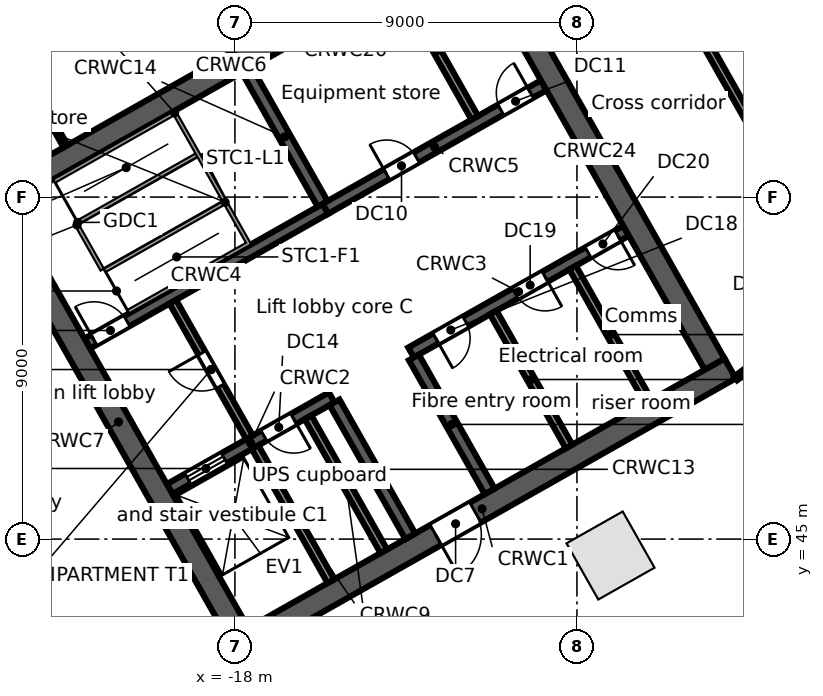
"""IFC4 building model, lengths in metres.
Left out: names, types, materials, properties, quantities, classifications, styles, units other than length and angle.
Written with IfcOpenShell. Run it as: python <this file> out.ifc"""

import sys

from ifc_helpers import new_model, si_unit, direction, frame, frame_2d, origin, origin_2d, place, context, subcontext, project, spatial, rectangle, extrude, element, fill, save


model = new_model("IFC4")
c1 = context("Model", 3, precision=1e-05, world=origin(), true_north=direction((0.0, 1.0)))
c2 = subcontext(c1, "Body", "Model", "MODEL_VIEW")
j1 = project(units=[si_unit("LENGTHUNIT", "METRE"), si_unit("PLANEANGLEUNIT", "RADIAN")], contexts=[c1])
p1 = place(None, origin())
s1 = spatial("IfcSite", under=j1, at=p1, CompositionType="ELEMENT")
p2 = place(p1, origin())
s2 = spatial("IfcBuilding", under=s1, at=p2, CompositionType="ELEMENT")
p3 = place(p2, frame((0.0, 0.0, 21.5)))
s3 = spatial("IfcBuildingStorey", under=s2, at=p3, CompositionType="ELEMENT", Elevation=21.5)
p4 = place(p3, frame((-8.117, 44.568, 0.0), z_axis=(0.0, 0.0, 1.0), x_axis=(0.87035569594, 0.492423560103, 0.0)))
e1 = element("IfcColumn", 1, at=p4, inside=s3, PredefinedType="COLUMN", context=c2, shape_type="SweptSolid", body=[
    extrude(rectangle(XDim=1.7, YDim=1.7, at=origin_2d()), origin(), (0.0, 0.0, 1.0), 5.0),
])
p5 = place(p3, frame((-63.707, 41.701, 0.0), z_axis=(0.0, 0.0, 1.0), x_axis=(0.870355510268, 0.492423888277, 0.0)))
e2 = element("IfcWall", 2, at=p5, inside=s3, PredefinedType="STANDARD", context=c2, shape_type="SweptSolid", body=[
    extrude(rectangle(XDim=67.903, YDim=0.3, at=frame_2d((33.952, 0.0))), origin(), (0.0, 0.0, 1.0), 4.68),
])
p6 = place(p3, frame((-18.024, 42.104, 0.0), z_axis=(0.0, 0.0, 1.0), x_axis=(0.870360574057, 0.492414937962, 0.0)))
e3 = element("IfcWall", 3, at=p6, inside=s3, PredefinedType="SOLIDWALL", context=c2, shape_type="SweptSolid", body=[
    extrude(rectangle(XDim=15.0, YDim=0.6, at=frame_2d((7.5, 0.0))), origin(), (0.0, 0.0, 1.0), 4.68),
])
p7 = place(p6, frame((6.1, 0.0, 0.0)))
e4 = element("IfcOpeningElement", 4, at=p7, cuts=e3, PredefinedType="OPENING", context=c2, shape_type="SweptSolid", body=[
    extrude(rectangle(XDim=1.2, YDim=2.1, at=frame_2d((0.6, 1.05))), frame((0.0, 0.31, 0.0), z_axis=(0.0, -1.0, 0.0), x_axis=(1.0, 0.0, 0.0)), (0.0, 0.0, 1.0), 0.62),
])
p8 = place(p3, frame((-19.718, 46.316, 0.0), z_axis=(0.0, 0.0, 1.0), x_axis=(0.870353963862, 0.492426621528, 0.0)))
e5 = element("IfcWall", 5, at=p8, inside=s3, PredefinedType="SOLIDWALL", context=c2, shape_type="SweptSolid", body=[
    extrude(rectangle(XDim=4.9, YDim=0.3, at=frame_2d((2.45, 0.0))), origin(), (0.0, 0.0, 1.0), 4.68),
])
p9 = place(p8, frame((0.55, 0.0, 0.0)))
e6 = element("IfcOpeningElement", 6, at=p9, cuts=e5, PredefinedType="OPENING", context=c2, shape_type="SweptSolid", body=[
    extrude(rectangle(XDim=1.1, YDim=2.1, at=frame_2d((0.55, 1.05))), frame((0.0, 0.16, 0.0), z_axis=(0.0, -1.0, 0.0), x_axis=(1.0, 0.0, 0.0)), (0.0, 0.0, 1.0), 0.32),
])
p10 = place(p8, frame((2.85, 0.0, 0.0)))
e7 = element("IfcOpeningElement", 7, at=p10, cuts=e5, PredefinedType="OPENING", context=c2, shape_type="SweptSolid", body=[
    extrude(rectangle(XDim=0.9, YDim=2.1, at=frame_2d((0.45, 1.05))), frame((0.0, 0.16, 0.0), z_axis=(0.0, -1.0, 0.0), x_axis=(1.0, 0.0, 0.0)), (0.0, 0.0, 1.0), 0.32),
])
p11 = place(p3, frame((-13.365, 49.911, 0.0), z_axis=(0.0, 0.0, 1.0), x_axis=(0.870340995471, 0.49244954219, 0.0)))
e8 = element("IfcWall", 8, at=p11, inside=s3, PredefinedType="SOLIDWALL", context=c2, shape_type="SweptSolid", body=[
    extrude(rectangle(XDim=6.5, YDim=0.3, at=frame_2d((3.25, 0.0))), origin(), (0.0, 0.0, 1.0), 4.68),
])
p12 = place(p11, frame((0.75, 0.0, 0.0)))
e9 = element("IfcOpeningElement", 9, at=p12, cuts=e8, PredefinedType="OPENING", context=c2, shape_type="SweptSolid", body=[
    extrude(rectangle(XDim=0.9, YDim=2.1, at=frame_2d((0.45, 1.05))), frame((0.0, 0.16, 0.0), z_axis=(0.0, -1.0, 0.0), x_axis=(1.0, 0.0, 0.0)), (0.0, 0.0, 1.0), 0.32),
])
p13 = place(p11, frame((3.15, 0.0, 0.0)))
e10 = element("IfcOpeningElement", 10, at=p13, cuts=e8, PredefinedType="OPENING", context=c2, shape_type="SweptSolid", body=[
    extrude(rectangle(XDim=0.9, YDim=2.1, at=frame_2d((0.45, 1.05))), frame((0.0, 0.16, 0.0), z_axis=(0.0, -1.0, 0.0), x_axis=(1.0, 0.0, 0.0)), (0.0, 0.0, 1.0), 0.32),
])
p14 = place(p11, frame((5.35, 0.0, 0.0)))
e11 = element("IfcOpeningElement", 11, at=p14, cuts=e8, PredefinedType="OPENING", context=c2, shape_type="SweptSolid", body=[
    extrude(rectangle(XDim=0.9, YDim=2.1, at=frame_2d((0.45, 1.05))), frame((0.0, 0.16, 0.0), z_axis=(0.0, -1.0, 0.0), x_axis=(1.0, 0.0, 0.0)), (0.0, 0.0, 1.0), 0.32),
])
p15 = place(p3, frame((-21.885, 50.146, 0.0), z_axis=(0.0, 0.0, 1.0), x_axis=(0.870359411463, 0.492416992881, 0.0)))
e12 = element("IfcWall", 12, at=p15, inside=s3, PredefinedType="SOLIDWALL", context=c2, shape_type="SweptSolid", body=[
    extrude(rectangle(XDim=7.2, YDim=0.3, at=frame_2d((3.6, 0.0))), origin(), (0.0, 0.0, 1.0), 4.68),
])
p16 = place(p15, frame((0.2, 0.0, 0.0)))
e13 = element("IfcOpeningElement", 13, at=p16, cuts=e12, PredefinedType="OPENING", context=c2, shape_type="SweptSolid", body=[
    extrude(rectangle(XDim=1.0, YDim=2.1, at=frame_2d((0.5, 1.05))), frame((0.0, 0.16, 0.0), z_axis=(0.0, -1.0, 0.0), x_axis=(1.0, 0.0, 0.0)), (0.0, 0.0, 1.0), 0.32),
])
p17 = place(p3, frame((-15.618, 53.691, 0.0), z_axis=(0.0, 0.0, 1.0), x_axis=(0.870356769198, 0.492421663121, 0.0)))
e14 = element("IfcWall", 14, at=p17, inside=s3, PredefinedType="SOLIDWALL", context=c2, shape_type="SweptSolid", body=[
    extrude(rectangle(XDim=6.6, YDim=0.3, at=frame_2d((3.3, 0.0))), origin(), (0.0, 0.0, 1.0), 4.68),
])
p18 = place(p17, frame((1.85, 0.0, 0.0)))
e15 = element("IfcOpeningElement", 15, at=p18, cuts=e14, PredefinedType="OPENING", context=c2, shape_type="SweptSolid", body=[
    extrude(rectangle(XDim=0.9, YDim=2.1, at=frame_2d((0.45, 1.05))), frame((0.0, 0.16, 0.0), z_axis=(0.0, -1.0, 0.0), x_axis=(1.0, 0.0, 0.0)), (0.0, 0.0, 1.0), 0.32),
])
p19 = place(p17, frame((5.3, 0.0, 0.0)))
e16 = element("IfcOpeningElement", 16, at=p19, cuts=e14, PredefinedType="OPENING", context=c2, shape_type="SweptSolid", body=[
    extrude(rectangle(XDim=0.9, YDim=2.1, at=frame_2d((0.45, 1.05))), frame((0.0, 0.16, 0.0), z_axis=(0.0, -1.0, 0.0), x_axis=(1.0, 0.0, 0.0)), (0.0, 0.0, 1.0), 0.32),
])
p20 = place(p3, frame((-24.623, 53.767, 0.0), z_axis=(0.0, 0.0, 1.0), x_axis=(0.870356627484, 0.492421913601, 0.0)))
e17 = element("IfcWall", 17, at=p20, inside=s3, PredefinedType="SOLIDWALL", context=c2, shape_type="SweptSolid", body=[
    extrude(rectangle(XDim=15.0, YDim=0.6, at=frame_2d((7.5, 0.0))), origin(), (0.0, 0.0, 1.0), 4.68),
])
p21 = place(p3, frame((-24.214, 53.654, 0.0), z_axis=(0.0, 0.0, 1.0), x_axis=(0.492441221355, -0.870345703448, 0.0)))
e18 = element("IfcWall", 18, at=p21, inside=s3, PredefinedType="SOLIDWALL", context=c2, shape_type="SweptSolid", body=[
    extrude(rectangle(XDim=12.8, YDim=0.6, at=frame_2d((6.4, 0.0))), origin(), (0.0, 0.0, 1.0), 4.68),
])
p22 = place(p3, frame((-17.469, 47.417, 0.0), z_axis=(0.0, 0.0, 1.0), x_axis=(0.492440575896, -0.870346068648, 0.0)))
e19 = element("IfcWall", 19, at=p22, inside=s3, PredefinedType="SOLIDWALL", context=c2, shape_type="SweptSolid", body=[
    extrude(rectangle(XDim=4.05, YDim=0.2, at=frame_2d((2.025, 0.0))), origin(), (0.0, 0.0, 1.0), 4.68),
])
p23 = place(p3, frame((-19.635, 51.246, 0.0), z_axis=(0.0, 0.0, 1.0), x_axis=(0.492408451753, -0.87036424366, 0.0)))
e20 = element("IfcWall", 20, at=p23, inside=s3, PredefinedType="PARTITIONING", context=c2, shape_type="SweptSolid", body=[
    extrude(rectangle(XDim=4.1, YDim=0.2, at=frame_2d((2.05, 0.0))), origin(), (0.0, 0.0, 1.0), 4.68),
])
p24 = place(p23, frame((1.55, 0.0, 0.0)))
e21 = element("IfcOpeningElement", 21, at=p24, cuts=e20, PredefinedType="OPENING", context=c2, shape_type="SweptSolid", body=[
    extrude(rectangle(XDim=1.0, YDim=2.1, at=frame_2d((0.5, 1.05))), frame((0.0, 0.11, 0.0), z_axis=(0.0, -1.0, 0.0), x_axis=(1.0, 0.0, 0.0)), (0.0, 0.0, 1.0), 0.22),
])
p25 = place(p3, frame((-16.076, 48.205, 0.0), z_axis=(0.0, 0.0, 1.0), x_axis=(0.492394910396, -0.870371904542, 0.0)))
e22 = element("IfcWall", 22, at=p25, inside=s3, PredefinedType="SOLIDWALL", context=c2, shape_type="SweptSolid", body=[
    extrude(rectangle(XDim=4.05, YDim=0.2, at=frame_2d((2.025, 0.0))), origin(), (0.0, 0.0, 1.0), 4.68),
])
p26 = place(p3, frame((-15.379, 48.599, 0.0), z_axis=(0.0, 0.0, 1.0), x_axis=(0.492394910396, -0.870371904542, 0.0)))
e23 = element("IfcWall", 23, at=p26, inside=s3, PredefinedType="SOLIDWALL", context=c2, shape_type="SweptSolid", body=[
    extrude(rectangle(XDim=4.05, YDim=0.3, at=frame_2d((2.025, 0.0))), origin(), (0.0, 0.0, 1.0), 4.68),
])
p27 = place(p3, frame((-17.686, 57.347, 0.0), z_axis=(0.0, 0.0, 1.0), x_axis=(0.492420746998, -0.870357287513, 0.0)))
e24 = element("IfcWall", 24, at=p27, inside=s3, PredefinedType="SOLIDWALL", context=c2, shape_type="SweptSolid", body=[
    extrude(rectangle(XDim=4.05, YDim=0.3, at=frame_2d((2.025, 0.0))), origin(), (0.0, 0.0, 1.0), 4.68),
])
p28 = place(p3, frame((-13.291, 49.781, 0.0), z_axis=(0.0, 0.0, 1.0), x_axis=(0.492394910396, -0.870371904542, 0.0)))
e25 = element("IfcWall", 25, at=p28, inside=s3, PredefinedType="SOLIDWALL", context=c2, shape_type="SweptSolid", body=[
    extrude(rectangle(XDim=4.05, YDim=0.3, at=frame_2d((2.025, 0.0))), origin(), (0.0, 0.0, 1.0), 4.68),
])
for number, where, z_axis, x_axis in (
    (26, (-11.202, 50.962, 0.0), (0.0, 0.0, 1.0), (0.492, -0.87, 0.0)),
    (27, (-13.683, 59.612, 0.0), (0.0, 0.0, 1.0), (0.492, -0.87, 0.0)),
):
    element("IfcWall", number, at=place(p3, frame(where, z_axis=z_axis, x_axis=x_axis)), inside=s3, PredefinedType="PARTITIONING", context=c2, shape_type="SweptSolid", body=[
        extrude(rectangle(XDim=4.05, YDim=0.2, at=frame_2d((2.025, 0.0))), origin(), (0.0, 0.0, 1.0), 4.68),
    ])
p29 = place(p3, frame((-9.113, 52.144, 0.0), z_axis=(0.0, 0.0, 1.0), x_axis=(0.492394910396, -0.870371904542, 0.0)))
e28 = element("IfcWall", 28, at=p29, inside=s3, PredefinedType="PARTITIONING", context=c2, shape_type="SweptSolid", body=[
    extrude(rectangle(XDim=4.05, YDim=0.2, at=frame_2d((2.025, 0.0))), origin(), (0.0, 0.0, 1.0), 4.68),
])
p30 = place(p3, frame((-11.681, 60.744, 0.0), z_axis=(0.0, 0.0, 1.0), x_axis=(0.492426772896, -0.870353878221, 0.0)))
e29 = element("IfcWall", 29, at=p30, inside=s3, PredefinedType="SOLIDWALL", context=c2, shape_type="SweptSolid", body=[
    extrude(rectangle(XDim=12.8, YDim=0.6, at=frame_2d((6.4, 0.0))), origin(), (0.0, 0.0, 1.0), 4.68),
])
p31 = place(p3, frame((-24.18, 58.384, 0.0), z_axis=(0.0, 0.0, 1.0), x_axis=(0.492521469645, -0.870300294116, 0.0)))
e30 = element("IfcWall", 30, at=p31, inside=s3, PredefinedType="PARTITIONING", context=c2, shape_type="SweptSolid", body=[
    extrude(rectangle(XDim=3.5, YDim=0.125, at=frame_2d((1.75, 0.0))), origin(), (0.0, 0.0, 1.0), 3.96),
])
p32 = place(p3, frame((-10.254, 66.263, 0.0), z_axis=(0.0, 0.0, 1.0), x_axis=(0.492411664329, -0.870362426138, 0.0)))
e31 = element("IfcWall", 31, at=p32, inside=s3, PredefinedType="PARTITIONING", context=c2, shape_type="SweptSolid", body=[
    extrude(rectangle(XDim=17.0, YDim=0.2, at=frame_2d((8.5, 0.0))), origin(), (0.0, 0.0, 1.0), 3.742),
])
p33 = place(p32, frame((7.7, 0.0, 0.0)))
e32 = element("IfcOpeningElement", 32, at=p33, cuts=e31, PredefinedType="OPENING", context=c2, shape_type="SweptSolid", body=[
    extrude(rectangle(XDim=1.8, YDim=2.1, at=frame_2d((0.9, 1.05))), frame((0.0, 0.11, 0.0), z_axis=(0.0, -1.0, 0.0), x_axis=(1.0, 0.0, 0.0)), (0.0, 0.0, 1.0), 0.22),
])
p34 = place(p3, frame((-4.821, 49.23, 0.0), z_axis=(0.0, 0.0, 1.0), x_axis=(0.795615322848, 0.605802160816, 0.0)))
e33 = element("IfcWall", 33, at=p34, inside=s3, PredefinedType="PARTITIONING", context=c2, shape_type="SweptSolid", body=[
    extrude(rectangle(XDim=3.693, YDim=0.125, at=frame_2d((1.846, 0.0))), origin(), (0.0, 0.0, 1.0), 4.68),
])
p35 = place(p34, frame((1.45, 0.0, 0.0)))
e34 = element("IfcOpeningElement", 34, at=p35, cuts=e33, PredefinedType="OPENING", context=c2, shape_type="SweptSolid", body=[
    extrude(rectangle(XDim=0.9, YDim=2.1, at=frame_2d((0.45, 1.05))), frame((0.0, 0.073, 0.0), z_axis=(0.0, -1.0, 0.0), x_axis=(1.0, 0.0, 0.0)), (0.0, 0.0, 1.0), 0.145),
])
p36 = place(p9, origin())
e35 = element("IfcDoor", 35, at=p36, inside=s3, OperationType="DOUBLE_DOOR_SLIDING", PredefinedType="DOOR", context=c2, shape_type="SweptSolid", body=[
    extrude(rectangle(XDim=1.1, YDim=2.1, at=frame_2d((0.55, 1.05))), frame((0.0, 0.025, 0.0), z_axis=(0.0, -1.0, 0.0), x_axis=(1.0, 0.0, 0.0)), (0.0, 0.0, 1.0), 0.05),
])
fill(e6, e35)
p37 = place(p16, origin())
e36 = element("IfcDoor", 36, at=p37, inside=s3, OperationType="SINGLE_SWING_LEFT", PredefinedType="DOOR", context=c2, shape_type="SweptSolid", body=[
    extrude(rectangle(XDim=1.0, YDim=2.1, at=frame_2d((0.5, 1.05))), frame((0.0, 0.025, 0.0), z_axis=(0.0, -1.0, 0.0), x_axis=(1.0, 0.0, 0.0)), (0.0, 0.0, 1.0), 0.05),
])
fill(e13, e36)
p38 = place(p24, frame((1.0, 0.0, 0.0), z_axis=(0.0, 0.0, 1.0), x_axis=(-1.0, 0.0, 0.0)))
e37 = element("IfcDoor", 37, at=p38, inside=s3, OperationType="SINGLE_SWING_RIGHT", PredefinedType="DOOR", context=c2, shape_type="SweptSolid", body=[
    extrude(rectangle(XDim=1.0, YDim=2.1, at=frame_2d((0.5, 1.05))), frame((0.0, 0.025, 0.0), z_axis=(0.0, -1.0, 0.0), x_axis=(1.0, 0.0, 0.0)), (0.0, 0.0, 1.0), 0.05),
])
fill(e21, e37)
p39 = place(p7, frame((1.2, 0.0, 0.0), z_axis=(0.0, 0.0, 1.0), x_axis=(-1.0, 0.0, 0.0)))
e38 = element("IfcDoor", 38, at=p39, inside=s3, OperationType="SINGLE_SWING_RIGHT", PredefinedType="DOOR", context=c2, shape_type="SweptSolid", body=[
    extrude(rectangle(XDim=1.2, YDim=2.1, at=frame_2d((0.6, 1.05))), frame((0.0, 0.025, 0.0), z_axis=(0.0, -1.0, 0.0), x_axis=(1.0, 0.0, 0.0)), (0.0, 0.0, 1.0), 0.05),
])
fill(e4, e38)
p40 = place(p18, origin())
e39 = element("IfcDoor", 39, at=p40, inside=s3, OperationType="SINGLE_SWING_LEFT", PredefinedType="DOOR", context=c2, shape_type="SweptSolid", body=[
    extrude(rectangle(XDim=0.9, YDim=2.1, at=frame_2d((0.45, 1.05))), frame((0.0, 0.025, 0.0), z_axis=(0.0, -1.0, 0.0), x_axis=(1.0, 0.0, 0.0)), (0.0, 0.0, 1.0), 0.05),
])
fill(e15, e39)
p41 = place(p19, origin())
e40 = element("IfcDoor", 40, at=p41, inside=s3, OperationType="SINGLE_SWING_RIGHT", PredefinedType="DOOR", context=c2, shape_type="SweptSolid", body=[
    extrude(rectangle(XDim=0.9, YDim=2.1, at=frame_2d((0.45, 1.05))), frame((0.0, 0.025, 0.0), z_axis=(0.0, -1.0, 0.0), x_axis=(1.0, 0.0, 0.0)), (0.0, 0.0, 1.0), 0.05),
])
fill(e16, e40)
p42 = place(p10, frame((0.9, 0.0, 0.0), z_axis=(0.0, 0.0, 1.0), x_axis=(-1.0, 0.0, 0.0)))
e41 = element("IfcDoor", 41, at=p42, inside=s3, OperationType="SINGLE_SWING_LEFT", PredefinedType="DOOR", context=c2, shape_type="SweptSolid", body=[
    extrude(rectangle(XDim=0.9, YDim=2.1, at=frame_2d((0.45, 1.05))), frame((0.0, 0.025, 0.0), z_axis=(0.0, -1.0, 0.0), x_axis=(1.0, 0.0, 0.0)), (0.0, 0.0, 1.0), 0.05),
])
fill(e7, e41)
p43 = place(p12, frame((0.9, 0.0, 0.0), z_axis=(0.0, 0.0, 1.0), x_axis=(-1.0, 0.0, 0.0)))
e42 = element("IfcDoor", 42, at=p43, inside=s3, OperationType="SINGLE_SWING_RIGHT", PredefinedType="DOOR", context=c2, shape_type="SweptSolid", body=[
    extrude(rectangle(XDim=0.9, YDim=2.1, at=frame_2d((0.45, 1.05))), frame((0.0, 0.025, 0.0), z_axis=(0.0, -1.0, 0.0), x_axis=(1.0, 0.0, 0.0)), (0.0, 0.0, 1.0), 0.05),
])
fill(e9, e42)
p44 = place(p13, frame((0.9, 0.0, 0.0), z_axis=(0.0, 0.0, 1.0), x_axis=(-1.0, 0.0, 0.0)))
e43 = element("IfcDoor", 43, at=p44, inside=s3, OperationType="SINGLE_SWING_LEFT", PredefinedType="DOOR", context=c2, shape_type="SweptSolid", body=[
    extrude(rectangle(XDim=0.9, YDim=2.1, at=frame_2d((0.45, 1.05))), frame((0.0, 0.025, 0.0), z_axis=(0.0, -1.0, 0.0), x_axis=(1.0, 0.0, 0.0)), (0.0, 0.0, 1.0), 0.05),
])
fill(e10, e43)
p45 = place(p14, frame((0.9, 0.0, 0.0), z_axis=(0.0, 0.0, 1.0), x_axis=(-1.0, 0.0, 0.0)))
e44 = element("IfcDoor", 44, at=p45, inside=s3, OperationType="SINGLE_SWING_LEFT", PredefinedType="DOOR", context=c2, shape_type="SweptSolid", body=[
    extrude(rectangle(XDim=0.9, YDim=2.1, at=frame_2d((0.45, 1.05))), frame((0.0, 0.025, 0.0), z_axis=(0.0, -1.0, 0.0), x_axis=(1.0, 0.0, 0.0)), (0.0, 0.0, 1.0), 0.05),
])
fill(e11, e44)
save(model, sys.argv[1])
